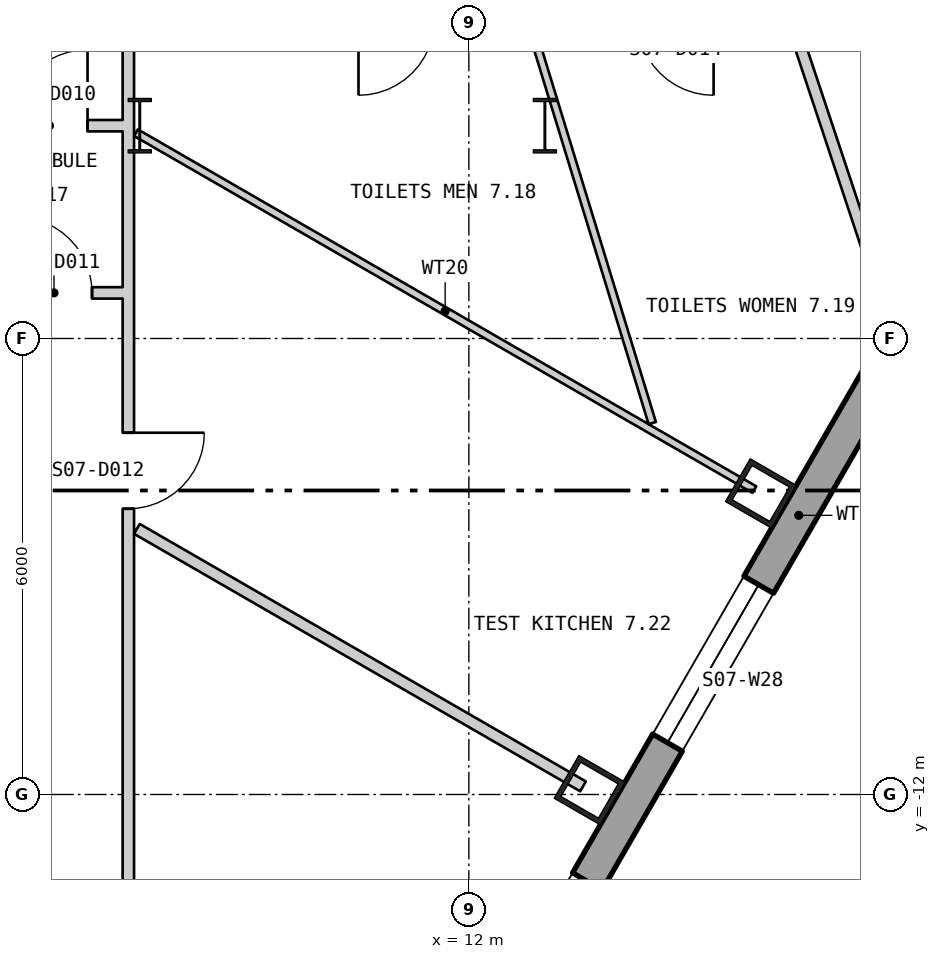
"""IFC4 building model, lengths in metres.
Left out: names, types, materials, properties, quantities, classifications, styles, units other than length and angle.
Written with IfcOpenShell. Run it as: python <this file> out.ifc"""

import sys

from ifc_helpers import new_model, si_unit, direction, frame, frame_2d, origin, origin_2d, place, context, subcontext, project, spatial, polyline, rectangle, hollow_rectangle, i_section, outline, extrude, element, fill, save


model = new_model("IFC4")
c1 = context("Model", 3, precision=1e-05, world=origin(), true_north=direction((0.0, 1.0)))
c2 = subcontext(c1, "Body", "Model", "MODEL_VIEW")
j1 = project(units=[si_unit("LENGTHUNIT", "METRE"), si_unit("PLANEANGLEUNIT", "RADIAN")], contexts=[c1])
p1 = place(None, origin())
s1 = spatial("IfcSite", under=j1, at=p1, CompositionType="ELEMENT")
p2 = place(p1, origin())
s2 = spatial("IfcBuilding", under=s1, at=p2, CompositionType="ELEMENT")
p3 = place(p2, frame((0.0, 0.0, 97.8)))
s3 = spatial("IfcBuildingStorey", under=s2, at=p3, CompositionType="ELEMENT", Elevation=97.8)
for number, where, z_axis, x_axis in (
    (1, (13.588, -11.943, 0.0), (0.0, 0.0, 1.0), (0.5, 0.866, 0.0)),
    (2, (15.842, -8.039, 0.0), (0.0, 0.0, 1.0), (0.5, 0.866, 0.0)),
):
    element("IfcColumn", number, at=place(p3, frame(where, z_axis=z_axis, x_axis=x_axis)), inside=s3, PredefinedType="COLUMN", context=c2, shape_type="SweptSolid", body=[
        extrude(hollow_rectangle(XDim=0.65, YDim=0.7, WallThickness=0.065, at=origin_2d()), origin(), (0.0, 0.0, 1.0), 4.5),
    ])
for number, where, z_axis, x_axis in (
    (3, (7.67, -3.2, 0.0), (0.0, 0.0, 1.0), (1.0, 0.0, 0.0)),
    (4, (13.0, -3.2, 0.0), (0.0, 0.0, 1.0), (1.0, 0.0, 0.0)),
):
    element("IfcColumn", number, at=place(p3, frame(where, z_axis=z_axis, x_axis=x_axis)), inside=s3, PredefinedType="COLUMN", context=c2, shape_type="SweptSolid", body=[
        extrude(i_section(OverallWidth=0.304, OverallDepth=0.716, WebThickness=0.021, FlangeThickness=0.04, at=origin_2d()), origin(), (0.0, 0.0, 1.0), 4.5),
    ])
p4 = place(p3, frame((4.905, -28.133, -0.18), z_axis=(0.0, 0.0, 1.0), x_axis=(0.500000711659, 0.866024992908, 0.0)))
e5 = element("IfcWall", 5, at=p4, inside=s3, PredefinedType="SOLIDWALL", context=c2, shape_type="SweptSolid", body=[
    extrude(outline(polyline([(-0.13, -0.225), (45.87, -0.225), (45.61, 0.225), (0.13, 0.225), (-0.13, -0.225)])), origin(), (0.0, 0.0, 1.0), 4.28),
])
p5 = place(p4, frame((1.424, 0.0, 1.08)))
e6 = element("IfcOpeningElement", 6, at=p5, cuts=e5, PredefinedType="OPENING", context=c2, shape_type="SweptSolid", body=[
    extrude(rectangle(XDim=2.4, YDim=2.6, at=frame_2d((1.2, 1.3))), frame((0.0, 0.235, 0.0), z_axis=(0.0, -1.0, 0.0), x_axis=(1.0, 0.0, 0.0)), (0.0, 0.0, 1.0), 0.47),
])
p6 = place(p4, frame((5.893, 0.0, 1.08)))
e7 = element("IfcOpeningElement", 7, at=p6, cuts=e5, PredefinedType="OPENING", context=c2, shape_type="SweptSolid", body=[
    extrude(rectangle(XDim=2.4, YDim=2.6, at=frame_2d((1.2, 1.3))), frame((0.0, 0.235, 0.0), z_axis=(0.0, -1.0, 0.0), x_axis=(1.0, 0.0, 0.0)), (0.0, 0.0, 1.0), 0.47),
])
p7 = place(p4, frame((10.401, 0.0, 1.08)))
e8 = element("IfcOpeningElement", 8, at=p7, cuts=e5, PredefinedType="OPENING", context=c2, shape_type="SweptSolid", body=[
    extrude(rectangle(XDim=2.4, YDim=2.6, at=frame_2d((1.2, 1.3))), frame((0.0, 0.235, 0.0), z_axis=(0.0, -1.0, 0.0), x_axis=(1.0, 0.0, 0.0)), (0.0, 0.0, 1.0), 0.47),
])
p8 = place(p4, frame((14.909, 0.0, 1.08)))
e9 = element("IfcOpeningElement", 9, at=p8, cuts=e5, PredefinedType="OPENING", context=c2, shape_type="SweptSolid", body=[
    extrude(rectangle(XDim=2.4, YDim=2.6, at=frame_2d((1.2, 1.3))), frame((0.0, 0.235, 0.0), z_axis=(0.0, -1.0, 0.0), x_axis=(1.0, 0.0, 0.0)), (0.0, 0.0, 1.0), 0.47),
])
p9 = place(p4, frame((19.416, 0.0, 1.08)))
e10 = element("IfcOpeningElement", 10, at=p9, cuts=e5, PredefinedType="OPENING", context=c2, shape_type="SweptSolid", body=[
    extrude(rectangle(XDim=2.4, YDim=2.6, at=frame_2d((1.2, 1.3))), frame((0.0, 0.235, 0.0), z_axis=(0.0, -1.0, 0.0), x_axis=(1.0, 0.0, 0.0)), (0.0, 0.0, 1.0), 0.47),
])
p10 = place(p4, frame((28.431, 0.0, 1.08)))
e11 = element("IfcOpeningElement", 11, at=p10, cuts=e5, PredefinedType="OPENING", context=c2, shape_type="SweptSolid", body=[
    extrude(rectangle(XDim=2.4, YDim=2.6, at=frame_2d((1.2, 1.3))), frame((0.0, 0.235, 0.0), z_axis=(0.0, -1.0, 0.0), x_axis=(1.0, 0.0, 0.0)), (0.0, 0.0, 1.0), 0.47),
])
p11 = place(p4, frame((32.939, 0.0, 1.08)))
e12 = element("IfcOpeningElement", 12, at=p11, cuts=e5, PredefinedType="OPENING", context=c2, shape_type="SweptSolid", body=[
    extrude(rectangle(XDim=2.4, YDim=2.6, at=frame_2d((1.2, 1.3))), frame((0.0, 0.235, 0.0), z_axis=(0.0, -1.0, 0.0), x_axis=(1.0, 0.0, 0.0)), (0.0, 0.0, 1.0), 0.47),
])
p12 = place(p4, frame((37.447, 0.0, 1.08)))
e13 = element("IfcOpeningElement", 13, at=p12, cuts=e5, PredefinedType="OPENING", context=c2, shape_type="SweptSolid", body=[
    extrude(rectangle(XDim=2.4, YDim=2.6, at=frame_2d((1.2, 1.3))), frame((0.0, 0.235, 0.0), z_axis=(0.0, -1.0, 0.0), x_axis=(1.0, 0.0, 0.0)), (0.0, 0.0, 1.0), 0.47),
])
p13 = place(p4, frame((41.916, 0.0, 1.08)))
e14 = element("IfcOpeningElement", 14, at=p13, cuts=e5, PredefinedType="OPENING", context=c2, shape_type="SweptSolid", body=[
    extrude(rectangle(XDim=2.4, YDim=2.6, at=frame_2d((1.2, 1.3))), frame((0.0, 0.235, 0.0), z_axis=(0.0, -1.0, 0.0), x_axis=(1.0, 0.0, 0.0)), (0.0, 0.0, 1.0), 0.47),
])
p14 = place(p3, frame((5.445, -3.2, 0.0), z_axis=(0.0, 0.0, 1.0), x_axis=(1.0, 0.0, 0.0)))
e15 = element("IfcWall", 15, at=p14, inside=s3, PredefinedType="PARTITIONING", context=c2, shape_type="SweptSolid", body=[
    extrude(rectangle(XDim=2.0, YDim=0.15, at=frame_2d((1.0, 0.0))), origin(), (0.0, 0.0, 1.0), 3.39),
])
p15 = place(p14, frame((0.538, 0.0, 0.0)))
e16 = element("IfcOpeningElement", 16, at=p15, cuts=e15, PredefinedType="OPENING", context=c2, shape_type="SweptSolid", body=[
    extrude(rectangle(XDim=1.0, YDim=2.1, at=frame_2d((0.5, 1.05))), frame((0.0, 0.085, 0.0), z_axis=(0.0, -1.0, 0.0), x_axis=(1.0, 0.0, 0.0)), (0.0, 0.0, 1.0), 0.17),
])
p16 = place(p3, frame((5.64, -5.4, 0.0), z_axis=(0.0, 0.0, 1.0), x_axis=(1.0, 0.0, 0.0)))
e17 = element("IfcWall", 17, at=p16, inside=s3, PredefinedType="PARTITIONING", context=c2, shape_type="SweptSolid", body=[
    extrude(rectangle(XDim=1.805, YDim=0.15, at=frame_2d((0.902, 0.0))), origin(), (0.0, 0.0, 1.0), 4.3),
])
p17 = place(p16, frame((0.402, 0.0, 0.0)))
e18 = element("IfcOpeningElement", 18, at=p17, cuts=e17, PredefinedType="OPENING", context=c2, shape_type="SweptSolid", body=[
    extrude(rectangle(XDim=1.0, YDim=2.1, at=frame_2d((0.5, 1.05))), frame((0.0, 0.085, 0.0), z_axis=(0.0, -1.0, 0.0), x_axis=(1.0, 0.0, 0.0)), (0.0, 0.0, 1.0), 0.17),
])
p18 = place(p3, frame((7.52, -13.675, 0.0), z_axis=(0.0, 0.0, 1.0), x_axis=(0.0, 1.0, 0.0)))
e19 = element("IfcWall", 19, at=p18, inside=s3, PredefinedType="PARTITIONING", context=c2, shape_type="SweptSolid", body=[
    extrude(rectangle(XDim=10.452, YDim=0.15, at=frame_2d((5.226, 0.0))), origin(), (0.0, 0.0, 1.0), 3.7),
])
p19 = place(p18, frame((5.435, 0.0, 0.0)))
e20 = element("IfcOpeningElement", 20, at=p19, cuts=e19, PredefinedType="OPENING", context=c2, shape_type="SweptSolid", body=[
    extrude(rectangle(XDim=1.0, YDim=2.1, at=frame_2d((0.5, 1.05))), frame((0.0, 0.085, 0.0), z_axis=(0.0, -1.0, 0.0), x_axis=(1.0, 0.0, 0.0)), (0.0, 0.0, 1.0), 0.17),
])
p20 = place(p3, frame((7.52, -3.223, 0.0), z_axis=(0.0, 0.0, 1.0), x_axis=(0.0, 1.0, 0.0)))
e21 = element("IfcWall", 21, at=p20, inside=s3, PredefinedType="PARTITIONING", context=c2, shape_type="SweptSolid", body=[
    extrude(rectangle(XDim=1.348, YDim=0.15, at=frame_2d((0.674, 0.0))), origin(), (0.0, 0.0, 1.0), 4.3),
])
p21 = place(p3, frame((7.62, -3.292, 0.0), z_axis=(0.0, 0.0, 1.0), x_axis=(0.866086324858, -0.499894466757, 0.0)))
e22 = element("IfcWall", 22, at=p21, inside=s3, PredefinedType="PARTITIONING", context=c2, shape_type="SweptSolid", body=[
    extrude(rectangle(XDim=9.394, YDim=0.1, at=frame_2d((4.697, 0.0))), origin(), (0.0, 0.0, 1.0), 4.3),
])
p22 = place(p3, frame((7.632, -8.505, 0.0), z_axis=(0.0, 0.0, 1.0), x_axis=(0.866092229152, -0.499884237201, 0.0)))
e23 = element("IfcWall", 23, at=p22, inside=s3, PredefinedType="PARTITIONING", context=c2, shape_type="SweptSolid", body=[
    extrude(rectangle(XDim=6.778, YDim=0.15, at=frame_2d((3.389, 0.0))), origin(), (0.0, 0.0, 1.0), 4.3),
])
p23 = place(p3, frame((12.815, -1.89, 0.0), z_axis=(0.0, 0.0, 1.0), x_axis=(0.292567369611, -0.956244913314, 0.0)))
e24 = element("IfcWall", 24, at=p23, inside=s3, PredefinedType="PARTITIONING", context=c2, shape_type="SweptSolid", body=[
    extrude(rectangle(XDim=5.462, YDim=0.1, at=frame_2d((2.731, 0.0))), origin(), (0.0, 0.0, 1.0), 4.3),
])
p24 = place(p3, frame((16.275, -1.899, 0.0), z_axis=(0.0, 0.0, 1.0), x_axis=(0.31563818617, -0.948879621149, 0.0)))
e25 = element("IfcWall", 25, at=p24, inside=s3, PredefinedType="PARTITIONING", context=c2, shape_type="SweptSolid", body=[
    extrude(rectangle(XDim=4.071, YDim=0.15, at=frame_2d((2.036, 0.0))), origin(), (0.0, 0.0, 1.0), 4.3),
])
p25 = place(p8, origin())
e26 = element("IfcWindow", 26, at=p25, inside=s3, PartitioningType="SINGLE_PANEL", PredefinedType="WINDOW", context=c2, shape_type="SweptSolid", body=[
    extrude(rectangle(XDim=2.4, YDim=2.6, at=frame_2d((1.2, 1.3))), frame((0.0, 0.105, 0.0), z_axis=(0.0, -1.0, 0.0), x_axis=(1.0, 0.0, 0.0)), (0.0, 0.0, 1.0), 0.06),
])
fill(e9, e26)
p26 = place(p9, origin())
e27 = element("IfcWindow", 27, at=p26, inside=s3, PartitioningType="SINGLE_PANEL", PredefinedType="WINDOW", context=c2, shape_type="SweptSolid", body=[
    extrude(rectangle(XDim=2.4, YDim=2.6, at=frame_2d((1.2, 1.3))), frame((0.0, 0.105, 0.0), z_axis=(0.0, -1.0, 0.0), x_axis=(1.0, 0.0, 0.0)), (0.0, 0.0, 1.0), 0.06),
])
fill(e10, e27)
p27 = place(p15, origin())
e28 = element("IfcDoor", 28, at=p27, inside=s3, OperationType="SINGLE_SWING_LEFT", PredefinedType="DOOR", context=c2, shape_type="SweptSolid", body=[
    extrude(rectangle(XDim=1.0, YDim=2.1, at=frame_2d((0.5, 1.05))), frame((0.0, 0.025, 0.0), z_axis=(0.0, -1.0, 0.0), x_axis=(1.0, 0.0, 0.0)), (0.0, 0.0, 1.0), 0.05),
])
fill(e16, e28)
p28 = place(p17, origin())
e29 = element("IfcDoor", 29, at=p28, inside=s3, OperationType="SINGLE_SWING_RIGHT", PredefinedType="DOOR", context=c2, shape_type="SweptSolid", body=[
    extrude(rectangle(XDim=1.0, YDim=2.1, at=frame_2d((0.5, 1.05))), frame((0.0, 0.025, 0.0), z_axis=(0.0, -1.0, 0.0), x_axis=(1.0, 0.0, 0.0)), (0.0, 0.0, 1.0), 0.05),
])
fill(e18, e29)
p29 = place(p19, origin())
e30 = element("IfcDoor", 30, at=p29, inside=s3, OperationType="SINGLE_SWING_RIGHT", PredefinedType="DOOR", context=c2, shape_type="SweptSolid", body=[
    extrude(rectangle(XDim=1.0, YDim=2.1, at=frame_2d((0.5, 1.05))), frame((0.0, 0.025, 0.0), z_axis=(0.0, -1.0, 0.0), x_axis=(1.0, 0.0, 0.0)), (0.0, 0.0, 1.0), 0.05),
])
fill(e20, e30)
save(model, sys.argv[1])
